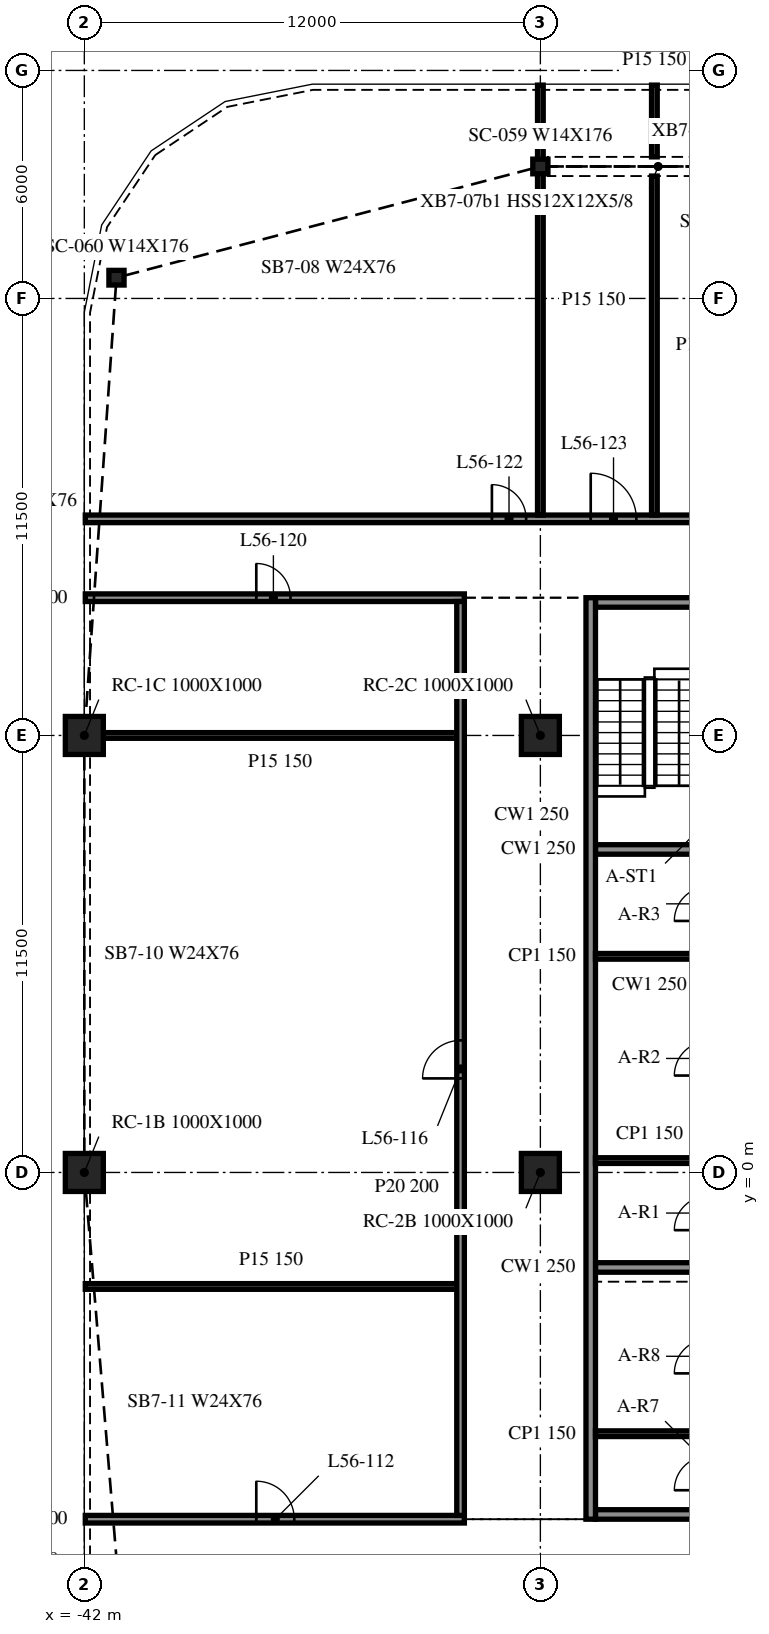
"""IFC4 building model, lengths in metres.
Left out: names, types, materials, properties, quantities, classifications, styles, units other than length and angle.
Written with IfcOpenShell. Run it as: python <this file> out.ifc"""

import sys

from ifc_helpers import new_model, si_unit, direction, frame, frame_2d, origin, origin_2d, place, context, subcontext, project, spatial, rectangle, i_section, extrude, element, fill, save


model = new_model("IFC4")
c1 = context("Model", 3, precision=1e-05, world=origin(), true_north=direction((0.0, 1.0)))
c2 = subcontext(c1, "Body", "Model", "MODEL_VIEW")
j1 = project(units=[si_unit("LENGTHUNIT", "METRE"), si_unit("PLANEANGLEUNIT", "RADIAN")], contexts=[c1])
p1 = place(None, origin())
s1 = spatial("IfcSite", under=j1, at=p1, CompositionType="ELEMENT")
p2 = place(p1, origin())
s2 = spatial("IfcBuilding", under=s1, at=p2, CompositionType="ELEMENT")
p3 = place(p2, frame((0.0, 0.0, 232.4)))
s3 = spatial("IfcBuildingStorey", under=s2, at=p3, CompositionType="ELEMENT", Elevation=232.4)
for number, where, z_axis, x_axis in (
    (1, (-42.0, 0.0, -0.34), (0.0, 0.0, 1.0), (1.0, 0.0, 0.0)),
    (2, (-42.0, 11.5, -0.34), (0.0, 0.0, 1.0), (1.0, 0.0, 0.0)),
    (3, (-30.0, 0.0, -0.34), (0.0, 0.0, 1.0), (1.0, 0.0, 0.0)),
    (4, (-30.0, 11.5, -0.34), (0.0, 0.0, 1.0), (1.0, 0.0, 0.0)),
):
    element("IfcColumn", number, at=place(p3, frame(where, z_axis=z_axis, x_axis=x_axis)), inside=s3, PredefinedType="COLUMN", context=c2, shape_type="SweptSolid", body=[
        extrude(rectangle(XDim=1.0, YDim=1.0, at=origin_2d()), origin(), (0.0, 0.0, 1.0), 3.8),
    ])
for number, where, z_axis, x_axis in (
    (5, (-30.0, 26.473, -0.34), (0.0, 0.0, 1.0), (1.0, 0.0, 0.0)),
    (6, (-41.154, 23.546, -0.34), (0.0, 0.0, 1.0), (1.0, 0.0, 0.0)),
):
    element("IfcColumn", number, at=place(p3, frame(where, z_axis=z_axis, x_axis=x_axis)), inside=s3, PredefinedType="COLUMN", context=c2, shape_type="SweptSolid", body=[
        extrude(i_section(OverallWidth=0.399, OverallDepth=0.386, WebThickness=0.021, FlangeThickness=0.033, at=origin_2d()), origin(), (0.0, 0.0, 1.0), 3.8),
    ])
p4 = place(p3, frame((-28.675, 15.125, 0.0), z_axis=(0.0, 0.0, 1.0), x_axis=(0.0, -1.0, 0.0)))
e7 = element("IfcWall", 7, at=p4, inside=s3, PredefinedType="SOLIDWALL", context=c2, shape_type="SweptSolid", body=[
    extrude(rectangle(XDim=24.25, YDim=0.25, at=frame_2d((12.125, 0.0))), origin(), (0.0, 0.0, 1.0), 3.46),
])
p5 = place(p3, frame((-19.45, -9.0, 0.0), z_axis=(0.0, 0.0, 1.0), x_axis=(-1.0, 0.0, 0.0)))
e8 = element("IfcWall", 8, at=p5, inside=s3, PredefinedType="SOLIDWALL", context=c2, shape_type="SweptSolid", body=[
    extrude(rectangle(XDim=9.1, YDim=0.25, at=frame_2d((4.55, 0.0))), origin(), (0.0, 0.0, 1.0), 3.46),
])
p6 = place(p5, frame((3.65, 0.0, 0.0)))
e9 = element("IfcOpeningElement", 9, at=p6, cuts=e8, PredefinedType="OPENING", context=c2, shape_type="SweptSolid", body=[
    extrude(rectangle(XDim=1.8, YDim=2.1, at=frame_2d((0.9, 1.05))), frame((0.0, 0.135, 0.0), z_axis=(0.0, -1.0, 0.0), x_axis=(1.0, 0.0, 0.0)), (0.0, 0.0, 1.0), 0.27),
])
p7 = place(p3, frame((-28.55, 15.0, 0.0), z_axis=(0.0, 0.0, 1.0), x_axis=(1.0, 0.0, 0.0)))
e10 = element("IfcWall", 10, at=p7, inside=s3, PredefinedType="SOLIDWALL", context=c2, shape_type="SweptSolid", body=[
    extrude(rectangle(XDim=9.1, YDim=0.25, at=frame_2d((4.55, 0.0))), origin(), (0.0, 0.0, 1.0), 3.46),
])
p8 = place(p7, frame((3.65, 0.0, 0.0)))
e11 = element("IfcOpeningElement", 11, at=p8, cuts=e10, PredefinedType="OPENING", context=c2, shape_type="SweptSolid", body=[
    extrude(rectangle(XDim=1.8, YDim=2.1, at=frame_2d((0.9, 1.05))), frame((0.0, 0.135, 0.0), z_axis=(0.0, -1.0, 0.0), x_axis=(1.0, 0.0, 0.0)), (0.0, 0.0, 1.0), 0.27),
])
for number, where, z_axis, x_axis in (
    (12, (-28.55, -2.5, 0.0), (0.0, 0.0, 1.0), (1.0, 0.0, 0.0)),
    (13, (-28.55, 8.5, 0.0), (0.0, 0.0, 1.0), (1.0, 0.0, 0.0)),
):
    element("IfcWall", number, at=place(p3, frame(where, z_axis=z_axis, x_axis=x_axis)), inside=s3, PredefinedType="SOLIDWALL", context=c2, shape_type="SweptSolid", body=[
        extrude(rectangle(XDim=2.85, YDim=0.25, at=frame_2d((1.425, 0.0))), origin(), (0.0, 0.0, 1.0), 3.46),
    ])
for number, where, z_axis, x_axis in (
    (14, (-28.55, 0.312, 0.0), (0.0, 0.0, 1.0), (1.0, 0.0, 0.0)),
    (15, (-28.55, 5.688, 0.0), (0.0, 0.0, 1.0), (1.0, 0.0, 0.0)),
    (16, (-28.55, -6.875, 0.0), (0.0, 0.0, 1.0), (1.0, 0.0, 0.0)),
):
    element("IfcWall", number, at=place(p3, frame(where, z_axis=z_axis, x_axis=x_axis)), inside=s3, PredefinedType="PARTITIONING", context=c2, shape_type="SweptSolid", body=[
        extrude(rectangle(XDim=2.85, YDim=0.15, at=frame_2d((1.425, 0.0))), origin(), (0.0, 0.0, 1.0), 3.46),
    ])
p9 = place(p3, frame((-41.975, -9.125, 0.0), z_axis=(0.0, 0.0, 1.0), x_axis=(1.0, 0.0, 0.0)))
e17 = element("IfcWall", 17, at=p9, inside=s3, PredefinedType="PARTITIONING", context=c2, shape_type="SweptSolid", body=[
    extrude(rectangle(XDim=9.975, YDim=0.2, at=frame_2d((4.988, 0.0))), origin(), (0.0, 0.0, 1.0), 3.46),
])
p10 = place(p9, frame((4.5, 0.0, 0.0)))
e18 = element("IfcOpeningElement", 18, at=p10, cuts=e17, PredefinedType="OPENING", context=c2, shape_type="SweptSolid", body=[
    extrude(rectangle(XDim=1.0, YDim=2.1, at=frame_2d((0.5, 1.05))), frame((0.0, 0.11, 0.0), z_axis=(0.0, -1.0, 0.0), x_axis=(1.0, 0.0, 0.0)), (0.0, 0.0, 1.0), 0.22),
])
p11 = place(p3, frame((-41.975, -3.0, 0.0), z_axis=(0.0, 0.0, 1.0), x_axis=(1.0, 0.0, 0.0)))
e19 = element("IfcWall", 19, at=p11, inside=s3, PredefinedType="PARTITIONING", context=c2, shape_type="SweptSolid", body=[
    extrude(rectangle(XDim=9.775, YDim=0.15, at=frame_2d((4.888, 0.0))), origin(), (0.0, 0.0, 1.0), 3.46),
])
p12 = place(p3, frame((-41.5, 11.5, 0.0), z_axis=(0.0, 0.0, 1.0), x_axis=(1.0, 0.0, 0.0)))
e20 = element("IfcWall", 20, at=p12, inside=s3, PredefinedType="PARTITIONING", context=c2, shape_type="SweptSolid", body=[
    extrude(rectangle(XDim=9.3, YDim=0.15, at=frame_2d((4.65, 0.0))), origin(), (0.0, 0.0, 1.0), 3.46),
])
p13 = place(p3, frame((-41.975, 15.125, 0.0), z_axis=(0.0, 0.0, 1.0), x_axis=(1.0, 0.0, 0.0)))
e21 = element("IfcWall", 21, at=p13, inside=s3, PredefinedType="PARTITIONING", context=c2, shape_type="SweptSolid", body=[
    extrude(rectangle(XDim=9.975, YDim=0.2, at=frame_2d((4.988, 0.0))), origin(), (0.0, 0.0, 1.0), 3.46),
])
p14 = place(p13, frame((4.5, 0.0, 0.0)))
e22 = element("IfcOpeningElement", 22, at=p14, cuts=e21, PredefinedType="OPENING", context=c2, shape_type="SweptSolid", body=[
    extrude(rectangle(XDim=0.9, YDim=2.1, at=frame_2d((0.45, 1.05))), frame((0.0, 0.11, 0.0), z_axis=(0.0, -1.0, 0.0), x_axis=(1.0, 0.0, 0.0)), (0.0, 0.0, 1.0), 0.22),
])
p15 = place(p3, frame((-41.975, 17.2, 0.0), z_axis=(0.0, 0.0, 1.0), x_axis=(1.0, 0.0, 0.0)))
e23 = element("IfcWall", 23, at=p15, inside=s3, PredefinedType="PARTITIONING", context=c2, shape_type="SweptSolid", body=[
    extrude(rectangle(XDim=95.95, YDim=0.2, at=frame_2d((47.975, 0.0))), origin(), (0.0, 0.0, 1.0), 3.46),
])
p16 = place(p15, frame((10.7, 0.0, 0.0)))
e24 = element("IfcOpeningElement", 24, at=p16, cuts=e23, PredefinedType="OPENING", context=c2, shape_type="SweptSolid", body=[
    extrude(rectangle(XDim=0.9, YDim=2.1, at=frame_2d((0.45, 1.05))), frame((0.0, 0.11, 0.0), z_axis=(0.0, -1.0, 0.0), x_axis=(1.0, 0.0, 0.0)), (0.0, 0.0, 1.0), 0.22),
])
p17 = place(p15, frame((13.3, 0.0, 0.0)))
e25 = element("IfcOpeningElement", 25, at=p17, cuts=e23, PredefinedType="OPENING", context=c2, shape_type="SweptSolid", body=[
    extrude(rectangle(XDim=1.2, YDim=2.1, at=frame_2d((0.6, 1.05))), frame((0.0, 0.11, 0.0), z_axis=(0.0, -1.0, 0.0), x_axis=(1.0, 0.0, 0.0)), (0.0, 0.0, 1.0), 0.22),
])
p18 = place(p15, frame((22.7, 0.0, 0.0)))
e26 = element("IfcOpeningElement", 26, at=p18, cuts=e23, PredefinedType="OPENING", context=c2, shape_type="SweptSolid", body=[
    extrude(rectangle(XDim=0.9, YDim=2.1, at=frame_2d((0.45, 1.05))), frame((0.0, 0.11, 0.0), z_axis=(0.0, -1.0, 0.0), x_axis=(1.0, 0.0, 0.0)), (0.0, 0.0, 1.0), 0.22),
])
p19 = place(p15, frame((28.3, 0.0, 0.0)))
e27 = element("IfcOpeningElement", 27, at=p19, cuts=e23, PredefinedType="OPENING", context=c2, shape_type="SweptSolid", body=[
    extrude(rectangle(XDim=1.2, YDim=2.1, at=frame_2d((0.6, 1.05))), frame((0.0, 0.11, 0.0), z_axis=(0.0, -1.0, 0.0), x_axis=(1.0, 0.0, 0.0)), (0.0, 0.0, 1.0), 0.22),
])
p20 = place(p15, frame((40.3, 0.0, 0.0)))
e28 = element("IfcOpeningElement", 28, at=p20, cuts=e23, PredefinedType="OPENING", context=c2, shape_type="SweptSolid", body=[
    extrude(rectangle(XDim=1.2, YDim=2.1, at=frame_2d((0.6, 1.05))), frame((0.0, 0.11, 0.0), z_axis=(0.0, -1.0, 0.0), x_axis=(1.0, 0.0, 0.0)), (0.0, 0.0, 1.0), 0.22),
])
p21 = place(p15, frame((43.7, 0.0, 0.0)))
e29 = element("IfcOpeningElement", 29, at=p21, cuts=e23, PredefinedType="OPENING", context=c2, shape_type="SweptSolid", body=[
    extrude(rectangle(XDim=0.9, YDim=2.1, at=frame_2d((0.45, 1.05))), frame((0.0, 0.11, 0.0), z_axis=(0.0, -1.0, 0.0), x_axis=(1.0, 0.0, 0.0)), (0.0, 0.0, 1.0), 0.22),
])
p22 = place(p15, frame((47.3, 0.0, 0.0)))
e30 = element("IfcOpeningElement", 30, at=p22, cuts=e23, PredefinedType="OPENING", context=c2, shape_type="SweptSolid", body=[
    extrude(rectangle(XDim=1.2, YDim=2.1, at=frame_2d((0.6, 1.05))), frame((0.0, 0.11, 0.0), z_axis=(0.0, -1.0, 0.0), x_axis=(1.0, 0.0, 0.0)), (0.0, 0.0, 1.0), 0.22),
])
p23 = place(p15, frame((54.1, 0.0, 0.0)))
e31 = element("IfcOpeningElement", 31, at=p23, cuts=e23, PredefinedType="OPENING", context=c2, shape_type="SweptSolid", body=[
    extrude(rectangle(XDim=0.9, YDim=2.1, at=frame_2d((0.45, 1.05))), frame((0.0, 0.11, 0.0), z_axis=(0.0, -1.0, 0.0), x_axis=(1.0, 0.0, 0.0)), (0.0, 0.0, 1.0), 0.22),
])
p24 = place(p15, frame((60.1, 0.0, 0.0)))
e32 = element("IfcOpeningElement", 32, at=p24, cuts=e23, PredefinedType="OPENING", context=c2, shape_type="SweptSolid", body=[
    extrude(rectangle(XDim=1.2, YDim=2.1, at=frame_2d((0.6, 1.05))), frame((0.0, 0.11, 0.0), z_axis=(0.0, -1.0, 0.0), x_axis=(1.0, 0.0, 0.0)), (0.0, 0.0, 1.0), 0.22),
])
p25 = place(p15, frame((72.1, 0.0, 0.0)))
e33 = element("IfcOpeningElement", 33, at=p25, cuts=e23, PredefinedType="OPENING", context=c2, shape_type="SweptSolid", body=[
    extrude(rectangle(XDim=1.2, YDim=2.1, at=frame_2d((0.6, 1.05))), frame((0.0, 0.11, 0.0), z_axis=(0.0, -1.0, 0.0), x_axis=(1.0, 0.0, 0.0)), (0.0, 0.0, 1.0), 0.22),
])
p26 = place(p15, frame((75.1, 0.0, 0.0)))
e34 = element("IfcOpeningElement", 34, at=p26, cuts=e23, PredefinedType="OPENING", context=c2, shape_type="SweptSolid", body=[
    extrude(rectangle(XDim=0.9, YDim=2.1, at=frame_2d((0.45, 1.05))), frame((0.0, 0.11, 0.0), z_axis=(0.0, -1.0, 0.0), x_axis=(1.0, 0.0, 0.0)), (0.0, 0.0, 1.0), 0.22),
])
p27 = place(p15, frame((84.1, 0.0, 0.0)))
e35 = element("IfcOpeningElement", 35, at=p27, cuts=e23, PredefinedType="OPENING", context=c2, shape_type="SweptSolid", body=[
    extrude(rectangle(XDim=1.2, YDim=2.1, at=frame_2d((0.6, 1.05))), frame((0.0, 0.11, 0.0), z_axis=(0.0, -1.0, 0.0), x_axis=(1.0, 0.0, 0.0)), (0.0, 0.0, 1.0), 0.22),
])
p28 = place(p15, frame((90.1, 0.0, 0.0)))
e36 = element("IfcOpeningElement", 36, at=p28, cuts=e23, PredefinedType="OPENING", context=c2, shape_type="SweptSolid", body=[
    extrude(rectangle(XDim=0.9, YDim=2.1, at=frame_2d((0.45, 1.05))), frame((0.0, 0.11, 0.0), z_axis=(0.0, -1.0, 0.0), x_axis=(1.0, 0.0, 0.0)), (0.0, 0.0, 1.0), 0.22),
])
p29 = place(p3, frame((-32.1, -9.025, 0.0), z_axis=(0.0, 0.0, 1.0), x_axis=(0.0, 1.0, 0.0)))
e37 = element("IfcWall", 37, at=p29, inside=s3, PredefinedType="PARTITIONING", context=c2, shape_type="SweptSolid", body=[
    extrude(rectangle(XDim=24.05, YDim=0.2, at=frame_2d((12.025, 0.0))), origin(), (0.0, 0.0, 1.0), 3.46),
])
p30 = place(p29, frame((11.5, 0.0, 0.0)))
e38 = element("IfcOpeningElement", 38, at=p30, cuts=e37, PredefinedType="OPENING", context=c2, shape_type="SweptSolid", body=[
    extrude(rectangle(XDim=1.0, YDim=2.1, at=frame_2d((0.5, 1.05))), frame((0.0, 0.11, 0.0), z_axis=(0.0, -1.0, 0.0), x_axis=(1.0, 0.0, 0.0)), (0.0, 0.0, 1.0), 0.22),
])
p31 = place(p3, frame((-30.0, 17.3, 0.0), z_axis=(0.0, 0.0, 1.0), x_axis=(0.0, 1.0, 0.0)))
e39 = element("IfcWall", 39, at=p31, inside=s3, PredefinedType="PARTITIONING", context=c2, shape_type="SweptSolid", body=[
    extrude(rectangle(XDim=11.314, YDim=0.15, at=frame_2d((5.657, 0.0))), origin(), (0.0, 0.0, 1.0), 3.46),
])
p32 = place(p3, frame((-27.0, 17.3, 0.0), z_axis=(0.0, 0.0, 1.0), x_axis=(0.0, 1.0, 0.0)))
e40 = element("IfcWall", 40, at=p32, inside=s3, PredefinedType="PARTITIONING", context=c2, shape_type="SweptSolid", body=[
    extrude(rectangle(XDim=8.921, YDim=0.15, at=frame_2d((4.46, 0.0))), origin(), (0.0, 0.0, 1.0), 3.46),
])
p33 = place(p3, frame((-27.0, 26.725, 0.0), z_axis=(0.0, 0.0, 1.0), x_axis=(0.0, 1.0, 0.0)))
e41 = element("IfcWall", 41, at=p33, inside=s3, PredefinedType="PARTITIONING", context=c2, shape_type="SweptSolid", body=[
    extrude(rectangle(XDim=1.889, YDim=0.15, at=frame_2d((0.944, 0.0))), origin(), (0.0, 0.0, 1.0), 3.46),
])
p34 = place(p10, origin())
e42 = element("IfcDoor", 42, at=p34, inside=s3, OperationType="SINGLE_SWING_RIGHT", PredefinedType="DOOR", context=c2, shape_type="SweptSolid", body=[
    extrude(rectangle(XDim=1.0, YDim=2.1, at=frame_2d((0.5, 1.05))), frame((0.0, 0.025, 0.0), z_axis=(0.0, -1.0, 0.0), x_axis=(1.0, 0.0, 0.0)), (0.0, 0.0, 1.0), 0.05),
])
fill(e18, e42)
p35 = place(p30, origin())
e43 = element("IfcDoor", 43, at=p35, inside=s3, OperationType="SINGLE_SWING_LEFT", PredefinedType="DOOR", context=c2, shape_type="SweptSolid", body=[
    extrude(rectangle(XDim=1.0, YDim=2.1, at=frame_2d((0.5, 1.05))), frame((0.0, 0.025, 0.0), z_axis=(0.0, -1.0, 0.0), x_axis=(1.0, 0.0, 0.0)), (0.0, 0.0, 1.0), 0.05),
])
fill(e38, e43)
p36 = place(p14, origin())
e44 = element("IfcDoor", 44, at=p36, inside=s3, OperationType="SINGLE_SWING_LEFT", PredefinedType="DOOR", context=c2, shape_type="SweptSolid", body=[
    extrude(rectangle(XDim=0.9, YDim=2.1, at=frame_2d((0.45, 1.05))), frame((0.0, 0.025, 0.0), z_axis=(0.0, -1.0, 0.0), x_axis=(1.0, 0.0, 0.0)), (0.0, 0.0, 1.0), 0.05),
])
fill(e22, e44)
p37 = place(p16, origin())
e45 = element("IfcDoor", 45, at=p37, inside=s3, OperationType="SINGLE_SWING_LEFT", PredefinedType="DOOR", context=c2, shape_type="SweptSolid", body=[
    extrude(rectangle(XDim=0.9, YDim=2.1, at=frame_2d((0.45, 1.05))), frame((0.0, 0.025, 0.0), z_axis=(0.0, -1.0, 0.0), x_axis=(1.0, 0.0, 0.0)), (0.0, 0.0, 1.0), 0.05),
])
fill(e24, e45)
p38 = place(p17, origin())
e46 = element("IfcDoor", 46, at=p38, inside=s3, OperationType="SINGLE_SWING_LEFT", PredefinedType="DOOR", context=c2, shape_type="SweptSolid", body=[
    extrude(rectangle(XDim=1.2, YDim=2.1, at=frame_2d((0.6, 1.05))), frame((0.0, 0.025, 0.0), z_axis=(0.0, -1.0, 0.0), x_axis=(1.0, 0.0, 0.0)), (0.0, 0.0, 1.0), 0.05),
])
fill(e25, e46)
save(model, sys.argv[1])
